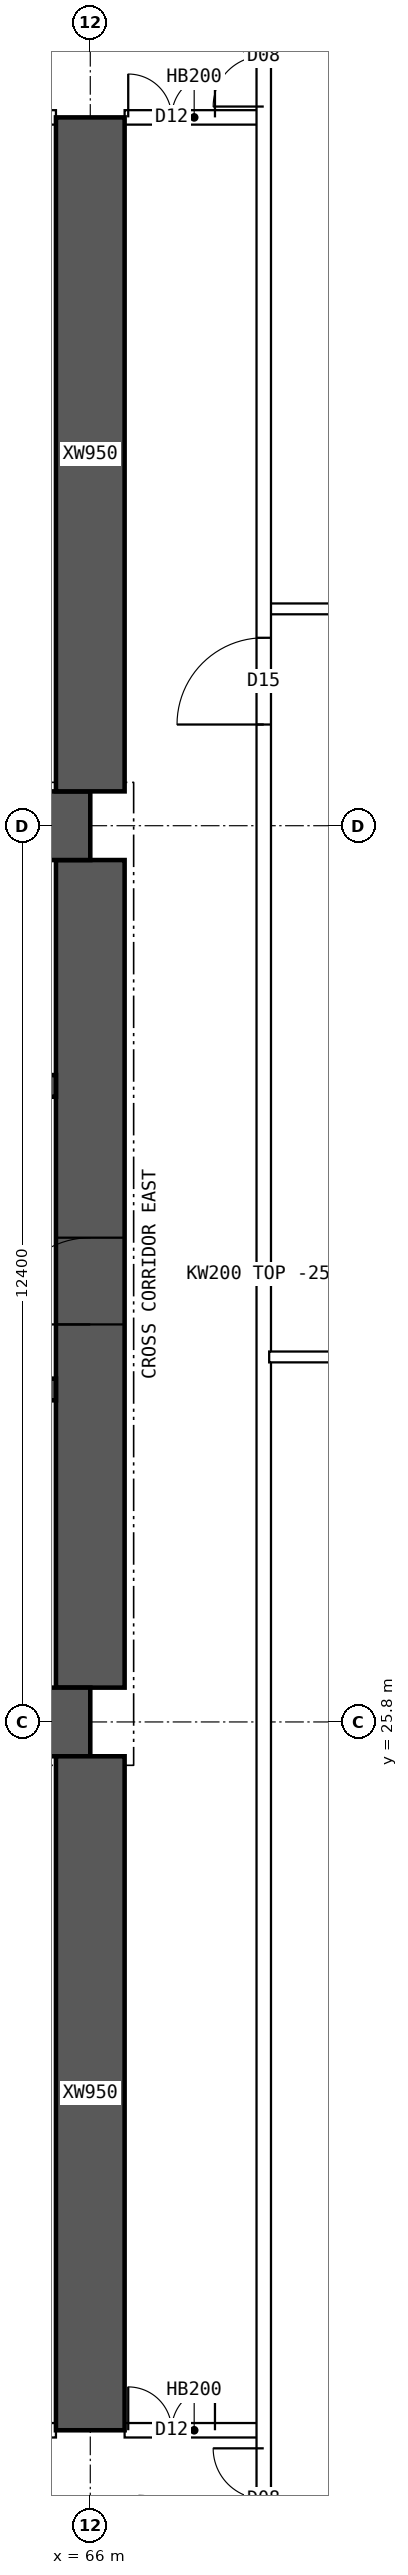
"""IFC4 building model, lengths in metres.
Left out: names, types, materials, properties, quantities, classifications, styles, units other than length and angle.
Written with IfcOpenShell. Run it as: python <this file> out.ifc"""

import sys

from ifc_helpers import new_model, si_unit, direction, frame, frame_2d, origin, place, context, subcontext, project, spatial, polyline, rectangle, outline, extrude, element, fill, save


model = new_model("IFC4")
c1 = context("Model", 3, precision=1e-05, world=origin(), true_north=direction((0.0, 1.0)))
c2 = subcontext(c1, "Body", "Model", "MODEL_VIEW")
j1 = project(units=[si_unit("LENGTHUNIT", "METRE"), si_unit("PLANEANGLEUNIT", "RADIAN")], contexts=[c1])
p1 = place(None, origin())
s1 = spatial("IfcSite", under=j1, at=p1, CompositionType="ELEMENT")
p2 = place(p1, origin())
s2 = spatial("IfcBuilding", under=s1, at=p2, CompositionType="ELEMENT")
p3 = place(p2, frame((0.0, 0.0, 84.4)))
s3 = spatial("IfcBuildingStorey", under=s2, at=p3, CompositionType="ELEMENT", Elevation=84.4)
for number, where, z_axis, x_axis in (
    (1, (18.0, 25.8, 0.0), (0.0, 0.0, 1.0), (1.0, 0.0, 0.0)),
    (2, (18.0, 38.2, 0.0), (0.0, 0.0, 1.0), (1.0, 0.0, 0.0)),
):
    element("IfcWall", number, at=place(p3, frame(where, z_axis=z_axis, x_axis=x_axis)), inside=s3, PredefinedType="SHEAR", context=c2, shape_type="SweptSolid", body=[
        extrude(rectangle(XDim=48.0, YDim=0.95, at=frame_2d((24.0, 0.0))), origin(), (0.0, 0.0, 1.0), 3.75),
    ])
p4 = place(p3, frame((66.0, 26.275, 0.0), z_axis=(0.0, 0.0, 1.0), x_axis=(0.0, 1.0, 0.0)))
e3 = element("IfcWall", 3, at=p4, inside=s3, PredefinedType="SHEAR", context=c2, shape_type="SweptSolid", body=[
    extrude(rectangle(XDim=11.45, YDim=0.95, at=frame_2d((5.725, 0.0))), origin(), (0.0, 0.0, 1.0), 3.75),
])
p5 = place(p4, frame((5.025, 0.0, 0.0)))
e4 = element("IfcOpeningElement", 4, at=p5, cuts=e3, PredefinedType="OPENING", context=c2, shape_type="SweptSolid", body=[
    extrude(rectangle(XDim=1.2, YDim=2.1, at=frame_2d((0.6, 1.05))), frame((0.0, 0.485, 0.0), z_axis=(0.0, -1.0, 0.0), x_axis=(1.0, 0.0, 0.0)), (0.0, 0.0, 1.0), 0.97),
])
p6 = place(p3, frame((18.475, 30.4, 0.0), z_axis=(0.0, 0.0, 1.0), x_axis=(1.0, 0.0, 0.0)))
e5 = element("IfcWall", 5, at=p6, inside=s3, PredefinedType="SHEAR", context=c2, shape_type="SweptSolid", body=[
    extrude(rectangle(XDim=47.05, YDim=0.3, at=frame_2d((23.525, 0.0))), origin(), (0.0, 0.0, 1.0), 3.75),
])
p7 = place(p6, frame((0.4, 0.0, 0.0)))
e6 = element("IfcOpeningElement", 6, at=p7, cuts=e5, PredefinedType="OPENING", context=c2, shape_type="SweptSolid", body=[
    extrude(rectangle(XDim=1.0, YDim=2.1, at=frame_2d((0.5, 1.05))), frame((0.0, 0.16, 0.0), z_axis=(0.0, -1.0, 0.0), x_axis=(1.0, 0.0, 0.0)), (0.0, 0.0, 1.0), 0.32),
])
p8 = place(p6, frame((45.65, 0.0, 0.0)))
e7 = element("IfcOpeningElement", 7, at=p8, cuts=e5, PredefinedType="OPENING", context=c2, shape_type="SweptSolid", body=[
    extrude(rectangle(XDim=1.0, YDim=2.1, at=frame_2d((0.5, 1.05))), frame((0.0, 0.16, 0.0), z_axis=(0.0, -1.0, 0.0), x_axis=(1.0, 0.0, 0.0)), (0.0, 0.0, 1.0), 0.32),
])
p9 = place(p6, frame((8.275, 0.0, 0.0)))
e8 = element("IfcOpeningElement", 8, at=p9, cuts=e5, PredefinedType="OPENING", context=c2, shape_type="SweptSolid", body=[
    extrude(rectangle(XDim=1.1, YDim=2.1, at=frame_2d((0.55, 1.05))), frame((0.0, 0.16, 0.0), z_axis=(0.0, -1.0, 0.0), x_axis=(1.0, 0.0, 0.0)), (0.0, 0.0, 1.0), 0.32),
])
p10 = place(p6, frame((10.875, 0.0, 0.0)))
e9 = element("IfcOpeningElement", 9, at=p10, cuts=e5, PredefinedType="OPENING", context=c2, shape_type="SweptSolid", body=[
    extrude(rectangle(XDim=1.1, YDim=2.1, at=frame_2d((0.55, 1.05))), frame((0.0, 0.16, 0.0), z_axis=(0.0, -1.0, 0.0), x_axis=(1.0, 0.0, 0.0)), (0.0, 0.0, 1.0), 0.32),
])
p11 = place(p6, frame((13.475, 0.0, 0.0)))
e10 = element("IfcOpeningElement", 10, at=p11, cuts=e5, PredefinedType="OPENING", context=c2, shape_type="SweptSolid", body=[
    extrude(rectangle(XDim=1.1, YDim=2.1, at=frame_2d((0.55, 1.05))), frame((0.0, 0.16, 0.0), z_axis=(0.0, -1.0, 0.0), x_axis=(1.0, 0.0, 0.0)), (0.0, 0.0, 1.0), 0.32),
])
p12 = place(p6, frame((16.075, 0.0, 0.0)))
e11 = element("IfcOpeningElement", 11, at=p12, cuts=e5, PredefinedType="OPENING", context=c2, shape_type="SweptSolid", body=[
    extrude(rectangle(XDim=1.1, YDim=2.1, at=frame_2d((0.55, 1.05))), frame((0.0, 0.16, 0.0), z_axis=(0.0, -1.0, 0.0), x_axis=(1.0, 0.0, 0.0)), (0.0, 0.0, 1.0), 0.32),
])
p13 = place(p6, frame((18.85, 0.0, 0.0)))
e12 = element("IfcOpeningElement", 12, at=p13, cuts=e5, PredefinedType="OPENING", context=c2, shape_type="SweptSolid", body=[
    extrude(rectangle(XDim=0.9, YDim=2.1, at=frame_2d((0.45, 1.05))), frame((0.0, 0.16, 0.0), z_axis=(0.0, -1.0, 0.0), x_axis=(1.0, 0.0, 0.0)), (0.0, 0.0, 1.0), 0.32),
])
p14 = place(p6, frame((30.142, 0.0, 0.0)))
e13 = element("IfcOpeningElement", 13, at=p14, cuts=e5, PredefinedType="OPENING", context=c2, shape_type="SweptSolid", body=[
    extrude(rectangle(XDim=1.1, YDim=2.1, at=frame_2d((0.55, 1.05))), frame((0.0, 0.16, 0.0), z_axis=(0.0, -1.0, 0.0), x_axis=(1.0, 0.0, 0.0)), (0.0, 0.0, 1.0), 0.32),
])
p15 = place(p6, frame((33.675, 0.0, 0.0)))
e14 = element("IfcOpeningElement", 14, at=p15, cuts=e5, PredefinedType="OPENING", context=c2, shape_type="SweptSolid", body=[
    extrude(rectangle(XDim=1.1, YDim=2.1, at=frame_2d((0.55, 1.05))), frame((0.0, 0.16, 0.0), z_axis=(0.0, -1.0, 0.0), x_axis=(1.0, 0.0, 0.0)), (0.0, 0.0, 1.0), 0.32),
])
p16 = place(p6, frame((37.208, 0.0, 0.0)))
e15 = element("IfcOpeningElement", 15, at=p16, cuts=e5, PredefinedType="OPENING", context=c2, shape_type="SweptSolid", body=[
    extrude(rectangle(XDim=1.1, YDim=2.1, at=frame_2d((0.55, 1.05))), frame((0.0, 0.16, 0.0), z_axis=(0.0, -1.0, 0.0), x_axis=(1.0, 0.0, 0.0)), (0.0, 0.0, 1.0), 0.32),
])
p17 = place(p3, frame((18.475, 34.6, 0.0), z_axis=(0.0, 0.0, 1.0), x_axis=(1.0, 0.0, 0.0)))
e16 = element("IfcWall", 16, at=p17, inside=s3, PredefinedType="SHEAR", context=c2, shape_type="SweptSolid", body=[
    extrude(rectangle(XDim=47.05, YDim=0.3, at=frame_2d((23.525, 0.0))), origin(), (0.0, 0.0, 1.0), 3.75),
])
p18 = place(p17, frame((0.9, 0.0, 0.0)))
e17 = element("IfcOpeningElement", 17, at=p18, cuts=e16, PredefinedType="OPENING", context=c2, shape_type="SweptSolid", body=[
    extrude(rectangle(XDim=1.1, YDim=2.1, at=frame_2d((0.55, 1.05))), frame((0.0, 0.16, 0.0), z_axis=(0.0, -1.0, 0.0), x_axis=(1.0, 0.0, 0.0)), (0.0, 0.0, 1.0), 0.32),
])
p19 = place(p17, frame((45.05, 0.0, 0.0)))
e18 = element("IfcOpeningElement", 18, at=p19, cuts=e16, PredefinedType="OPENING", context=c2, shape_type="SweptSolid", body=[
    extrude(rectangle(XDim=1.1, YDim=2.1, at=frame_2d((0.55, 1.05))), frame((0.0, 0.16, 0.0), z_axis=(0.0, -1.0, 0.0), x_axis=(1.0, 0.0, 0.0)), (0.0, 0.0, 1.0), 0.32),
])
p20 = place(p17, frame((4.125, 0.0, 0.0)))
e19 = element("IfcOpeningElement", 19, at=p20, cuts=e16, PredefinedType="OPENING", context=c2, shape_type="SweptSolid", body=[
    extrude(rectangle(XDim=0.9, YDim=2.1, at=frame_2d((0.45, 1.05))), frame((0.0, 0.16, 0.0), z_axis=(0.0, -1.0, 0.0), x_axis=(1.0, 0.0, 0.0)), (0.0, 0.0, 1.0), 0.32),
])
p21 = place(p17, frame((42.025, 0.0, 0.0)))
e20 = element("IfcOpeningElement", 20, at=p21, cuts=e16, PredefinedType="OPENING", context=c2, shape_type="SweptSolid", body=[
    extrude(rectangle(XDim=0.9, YDim=2.1, at=frame_2d((0.45, 1.05))), frame((0.0, 0.16, 0.0), z_axis=(0.0, -1.0, 0.0), x_axis=(1.0, 0.0, 0.0)), (0.0, 0.0, 1.0), 0.32),
])
p22 = place(p17, frame((8.9, 0.0, 0.0)))
e21 = element("IfcOpeningElement", 21, at=p22, cuts=e16, PredefinedType="OPENING", context=c2, shape_type="SweptSolid", body=[
    extrude(rectangle(XDim=0.9, YDim=2.1, at=frame_2d((0.45, 1.05))), frame((0.0, 0.16, 0.0), z_axis=(0.0, -1.0, 0.0), x_axis=(1.0, 0.0, 0.0)), (0.0, 0.0, 1.0), 0.32),
])
p23 = place(p17, frame((12.874, 0.0, 0.0)))
e22 = element("IfcOpeningElement", 22, at=p23, cuts=e16, PredefinedType="OPENING", context=c2, shape_type="SweptSolid", body=[
    extrude(rectangle(XDim=0.9, YDim=2.1, at=frame_2d((0.45, 1.05))), frame((0.0, 0.16, 0.0), z_axis=(0.0, -1.0, 0.0), x_axis=(1.0, 0.0, 0.0)), (0.0, 0.0, 1.0), 0.32),
])
p24 = place(p17, frame((16.521, 0.0, 0.0)))
e23 = element("IfcOpeningElement", 23, at=p24, cuts=e16, PredefinedType="OPENING", context=c2, shape_type="SweptSolid", body=[
    extrude(rectangle(XDim=0.9, YDim=2.1, at=frame_2d((0.45, 1.05))), frame((0.0, 0.16, 0.0), z_axis=(0.0, -1.0, 0.0), x_axis=(1.0, 0.0, 0.0)), (0.0, 0.0, 1.0), 0.32),
])
p25 = place(p17, frame((20.28, 0.0, 0.0)))
e24 = element("IfcOpeningElement", 24, at=p25, cuts=e16, PredefinedType="OPENING", context=c2, shape_type="SweptSolid", body=[
    extrude(rectangle(XDim=0.9, YDim=2.1, at=frame_2d((0.45, 1.05))), frame((0.0, 0.16, 0.0), z_axis=(0.0, -1.0, 0.0), x_axis=(1.0, 0.0, 0.0)), (0.0, 0.0, 1.0), 0.32),
])
p26 = place(p17, frame((24.686, 0.0, 0.0)))
e25 = element("IfcOpeningElement", 25, at=p26, cuts=e16, PredefinedType="OPENING", context=c2, shape_type="SweptSolid", body=[
    extrude(rectangle(XDim=0.9, YDim=2.1, at=frame_2d((0.45, 1.05))), frame((0.0, 0.16, 0.0), z_axis=(0.0, -1.0, 0.0), x_axis=(1.0, 0.0, 0.0)), (0.0, 0.0, 1.0), 0.32),
])
p27 = place(p17, frame((27.483, 0.0, 0.0)))
e26 = element("IfcOpeningElement", 26, at=p27, cuts=e16, PredefinedType="OPENING", context=c2, shape_type="SweptSolid", body=[
    extrude(rectangle(XDim=0.9, YDim=2.1, at=frame_2d((0.45, 1.05))), frame((0.0, 0.16, 0.0), z_axis=(0.0, -1.0, 0.0), x_axis=(1.0, 0.0, 0.0)), (0.0, 0.0, 1.0), 0.32),
])
p28 = place(p17, frame((33.604, 0.0, 0.0)))
e27 = element("IfcOpeningElement", 27, at=p28, cuts=e16, PredefinedType="OPENING", context=c2, shape_type="SweptSolid", body=[
    extrude(rectangle(XDim=0.9, YDim=2.1, at=frame_2d((0.45, 1.05))), frame((0.0, 0.16, 0.0), z_axis=(0.0, -1.0, 0.0), x_axis=(1.0, 0.0, 0.0)), (0.0, 0.0, 1.0), 0.32),
])
for number, where, z_axis, x_axis in (
    (28, (66.0, 16.0, 0.0), (0.0, 0.0, 1.0), (0.0, 1.0, 0.0)),
    (29, (66.0, 38.675, 0.0), (0.0, 0.0, 1.0), (0.0, 1.0, 0.0)),
):
    element("IfcWall", number, at=place(p3, frame(where, z_axis=z_axis, x_axis=x_axis)), inside=s3, PredefinedType="SHEAR", context=c2, shape_type="SweptSolid", body=[
        extrude(rectangle(XDim=9.325, YDim=0.95, at=frame_2d((4.663, 0.0))), origin(), (0.0, 0.0, 1.0), 3.75),
    ])
p29 = place(p3, frame((60.475, 16.0, 0.0), z_axis=(0.0, 0.0, 1.0), x_axis=(1.0, 0.0, 0.0)))
e30 = element("IfcWall", 30, at=p29, inside=s3, PredefinedType="SOLIDWALL", context=c2, shape_type="SweptSolid", body=[
    extrude(rectangle(XDim=5.05, YDim=0.2, at=frame_2d((2.525, 0.0))), origin(), (0.0, 0.0, 1.0), 3.5),
])
p30 = place(p29, frame((0.15, 0.0, 0.0)))
e31 = element("IfcOpeningElement", 31, at=p30, cuts=e30, PredefinedType="OPENING", context=c2, shape_type="SweptSolid", body=[
    extrude(rectangle(XDim=0.9, YDim=2.1, at=frame_2d((0.45, 1.05))), frame((0.0, 0.11, 0.0), z_axis=(0.0, -1.0, 0.0), x_axis=(1.0, 0.0, 0.0)), (0.0, 0.0, 1.0), 0.22),
])
p31 = place(p29, frame((3.465, 0.0, 0.0)))
e32 = element("IfcOpeningElement", 32, at=p31, cuts=e30, PredefinedType="OPENING", context=c2, shape_type="SweptSolid", body=[
    extrude(rectangle(XDim=0.9, YDim=2.1, at=frame_2d((0.45, 1.05))), frame((0.0, 0.11, 0.0), z_axis=(0.0, -1.0, 0.0), x_axis=(1.0, 0.0, 0.0)), (0.0, 0.0, 1.0), 0.22),
])
p32 = place(p3, frame((66.475, 16.0, 0.0), z_axis=(0.0, 0.0, 1.0), x_axis=(1.0, 0.0, 0.0)))
e33 = element("IfcWall", 33, at=p32, inside=s3, PredefinedType="SOLIDWALL", context=c2, shape_type="SweptSolid", body=[
    extrude(rectangle(XDim=1.925, YDim=0.2, at=frame_2d((0.962, 0.0))), origin(), (0.0, 0.0, 1.0), 3.5),
])
p33 = place(p32, frame((0.05, 0.0, 0.0)))
e34 = element("IfcOpeningElement", 34, at=p33, cuts=e33, PredefinedType="OPENING", context=c2, shape_type="SweptSolid", body=[
    extrude(rectangle(XDim=1.2, YDim=2.1, at=frame_2d((0.6, 1.05))), frame((0.0, 0.11, 0.0), z_axis=(0.0, -1.0, 0.0), x_axis=(1.0, 0.0, 0.0)), (0.0, 0.0, 1.0), 0.22),
])
p34 = place(p3, frame((60.475, 48.0, 0.0), z_axis=(0.0, 0.0, 1.0), x_axis=(1.0, 0.0, 0.0)))
e35 = element("IfcWall", 35, at=p34, inside=s3, PredefinedType="SOLIDWALL", context=c2, shape_type="SweptSolid", body=[
    extrude(rectangle(XDim=5.05, YDim=0.2, at=frame_2d((2.525, 0.0))), origin(), (0.0, 0.0, 1.0), 3.5),
])
p35 = place(p34, frame((0.15, 0.0, 0.0)))
e36 = element("IfcOpeningElement", 36, at=p35, cuts=e35, PredefinedType="OPENING", context=c2, shape_type="SweptSolid", body=[
    extrude(rectangle(XDim=0.9, YDim=2.1, at=frame_2d((0.45, 1.05))), frame((0.0, 0.11, 0.0), z_axis=(0.0, -1.0, 0.0), x_axis=(1.0, 0.0, 0.0)), (0.0, 0.0, 1.0), 0.22),
])
p36 = place(p34, frame((1.955, 0.0, 0.0)))
e37 = element("IfcOpeningElement", 37, at=p36, cuts=e35, PredefinedType="OPENING", context=c2, shape_type="SweptSolid", body=[
    extrude(rectangle(XDim=0.9, YDim=2.1, at=frame_2d((0.45, 1.05))), frame((0.0, 0.11, 0.0), z_axis=(0.0, -1.0, 0.0), x_axis=(1.0, 0.0, 0.0)), (0.0, 0.0, 1.0), 0.22),
])
p37 = place(p3, frame((66.475, 48.0, 0.0), z_axis=(0.0, 0.0, 1.0), x_axis=(1.0, 0.0, 0.0)))
e38 = element("IfcWall", 38, at=p37, inside=s3, PredefinedType="SOLIDWALL", context=c2, shape_type="SweptSolid", body=[
    extrude(rectangle(XDim=1.925, YDim=0.2, at=frame_2d((0.962, 0.0))), origin(), (0.0, 0.0, 1.0), 3.5),
])
p38 = place(p37, frame((0.05, 0.0, 0.0)))
e39 = element("IfcOpeningElement", 39, at=p38, cuts=e38, PredefinedType="OPENING", context=c2, shape_type="SweptSolid", body=[
    extrude(rectangle(XDim=1.2, YDim=2.1, at=frame_2d((0.6, 1.05))), frame((0.0, 0.11, 0.0), z_axis=(0.0, -1.0, 0.0), x_axis=(1.0, 0.0, 0.0)), (0.0, 0.0, 1.0), 0.22),
])
p39 = place(p3, frame((68.475, 30.85, 0.0), z_axis=(0.0, 0.0, 1.0), x_axis=(1.0, 0.0, 0.0)))
e40 = element("IfcWall", 40, at=p39, inside=s3, PredefinedType="PARTITIONING", context=c2, shape_type="SweptSolid", body=[
    extrude(outline(polyline([(0.0, 0.0), (6.82, 0.0), (6.82, 3.5), (3.827, 3.5), (3.825, 3.05), (3.227, 3.05), (3.225, 3.5), (0.0, 3.5), (0.0, 0.0)])), frame((0.0, 0.075, 0.0), z_axis=(0.0, -1.0, 0.0), x_axis=(1.0, 0.0, 0.0)), (0.0, 0.0, 1.0), 0.15),
])
p40 = place(p3, frame((68.4, 9.405, 0.0), z_axis=(0.0, 0.0, 1.0), x_axis=(0.0, 1.0, 0.0)))
e41 = element("IfcWall", 41, at=p40, inside=s3, PredefinedType="SOLIDWALL", context=c2, shape_type="SweptSolid", body=[
    extrude(rectangle(XDim=45.189, YDim=0.2, at=frame_2d((22.595, 0.0))), origin(), (0.0, 0.0, 1.0), 3.5),
])
p41 = place(p40, frame((30.195, 0.0, 0.0)))
e42 = element("IfcOpeningElement", 42, at=p41, cuts=e41, PredefinedType="OPENING", context=c2, shape_type="SweptSolid", body=[
    extrude(rectangle(XDim=1.2, YDim=2.1, at=frame_2d((0.6, 1.05))), frame((0.0, 0.11, 0.0), z_axis=(0.0, -1.0, 0.0), x_axis=(1.0, 0.0, 0.0)), (0.0, 0.0, 1.0), 0.22),
])
p42 = place(p40, frame((4.945, 0.0, 0.0)))
e43 = element("IfcOpeningElement", 43, at=p42, cuts=e41, PredefinedType="OPENING", context=c2, shape_type="SweptSolid", body=[
    extrude(rectangle(XDim=1.4, YDim=2.1, at=frame_2d((0.7, 1.05))), frame((0.0, 0.11, 0.0), z_axis=(0.0, -1.0, 0.0), x_axis=(1.0, 0.0, 0.0)), (0.0, 0.0, 1.0), 0.22),
])
p43 = place(p40, frame((38.745, 0.0, 0.0)))
e44 = element("IfcOpeningElement", 44, at=p43, cuts=e41, PredefinedType="OPENING", context=c2, shape_type="SweptSolid", body=[
    extrude(rectangle(XDim=1.4, YDim=2.1, at=frame_2d((0.7, 1.05))), frame((0.0, 0.11, 0.0), z_axis=(0.0, -1.0, 0.0), x_axis=(1.0, 0.0, 0.0)), (0.0, 0.0, 1.0), 0.22),
])
p44 = place(p3, frame((68.475, 41.2, 0.0), z_axis=(0.0, 0.0, 1.0), x_axis=(1.0, 0.0, 0.0)))
e45 = element("IfcWall", 45, at=p44, inside=s3, PredefinedType="PARTITIONING", context=c2, shape_type="SweptSolid", body=[
    extrude(outline(polyline([(0.0, 0.0), (6.82, 0.0), (6.82, 3.5), (3.827, 3.5), (3.825, 3.05), (3.227, 3.05), (3.225, 3.5), (0.0, 3.5), (0.0, 0.0)])), frame((0.0, 0.075, 0.0), z_axis=(0.0, -1.0, 0.0), x_axis=(1.0, 0.0, 0.0)), (0.0, 0.0, 1.0), 0.15),
])
p45 = place(p5, origin())
e46 = element("IfcDoor", 46, at=p45, inside=s3, OperationType="SINGLE_SWING_LEFT", PredefinedType="DOOR", context=c2, shape_type="SweptSolid", body=[
    extrude(rectangle(XDim=1.2, YDim=2.1, at=frame_2d((0.6, 1.05))), frame((0.0, 0.025, 0.0), z_axis=(0.0, -1.0, 0.0), x_axis=(1.0, 0.0, 0.0)), (0.0, 0.0, 1.0), 0.05),
])
fill(e4, e46)
p46 = place(p33, origin())
e47 = element("IfcDoor", 47, at=p46, inside=s3, OperationType="DOUBLE_DOOR_SINGLE_SWING", PredefinedType="DOOR", context=c2, shape_type="SweptSolid", body=[
    extrude(rectangle(XDim=1.2, YDim=2.1, at=frame_2d((0.6, 1.05))), frame((0.0, 0.025, 0.0), z_axis=(0.0, -1.0, 0.0), x_axis=(1.0, 0.0, 0.0)), (0.0, 0.0, 1.0), 0.05),
])
fill(e34, e47)
p47 = place(p38, origin())
e48 = element("IfcDoor", 48, at=p47, inside=s3, OperationType="DOUBLE_DOOR_SINGLE_SWING", PredefinedType="DOOR", context=c2, shape_type="SweptSolid", body=[
    extrude(rectangle(XDim=1.2, YDim=2.1, at=frame_2d((0.6, 1.05))), frame((0.0, 0.025, 0.0), z_axis=(0.0, -1.0, 0.0), x_axis=(1.0, 0.0, 0.0)), (0.0, 0.0, 1.0), 0.05),
])
fill(e39, e48)
p48 = place(p41, origin())
e49 = element("IfcDoor", 49, at=p48, inside=s3, OperationType="SINGLE_SWING_LEFT", PredefinedType="DOOR", context=c2, shape_type="SweptSolid", body=[
    extrude(rectangle(XDim=1.2, YDim=2.1, at=frame_2d((0.6, 1.05))), frame((0.0, 0.025, 0.0), z_axis=(0.0, -1.0, 0.0), x_axis=(1.0, 0.0, 0.0)), (0.0, 0.0, 1.0), 0.05),
])
fill(e42, e49)
p49 = place(p42, origin())
e50 = element("IfcDoor", 50, at=p49, inside=s3, OperationType="DOUBLE_DOOR_SINGLE_SWING", PredefinedType="DOOR", context=c2, shape_type="SweptSolid", body=[
    extrude(rectangle(XDim=1.4, YDim=2.1, at=frame_2d((0.7, 1.05))), frame((0.0, 0.025, 0.0), z_axis=(0.0, -1.0, 0.0), x_axis=(1.0, 0.0, 0.0)), (0.0, 0.0, 1.0), 0.05),
])
fill(e43, e50)
p50 = place(p43, origin())
e51 = element("IfcDoor", 51, at=p50, inside=s3, OperationType="DOUBLE_DOOR_SINGLE_SWING", PredefinedType="DOOR", context=c2, shape_type="SweptSolid", body=[
    extrude(rectangle(XDim=1.4, YDim=2.1, at=frame_2d((0.7, 1.05))), frame((0.0, 0.025, 0.0), z_axis=(0.0, -1.0, 0.0), x_axis=(1.0, 0.0, 0.0)), (0.0, 0.0, 1.0), 0.05),
])
fill(e44, e51)
save(model, sys.argv[1])
